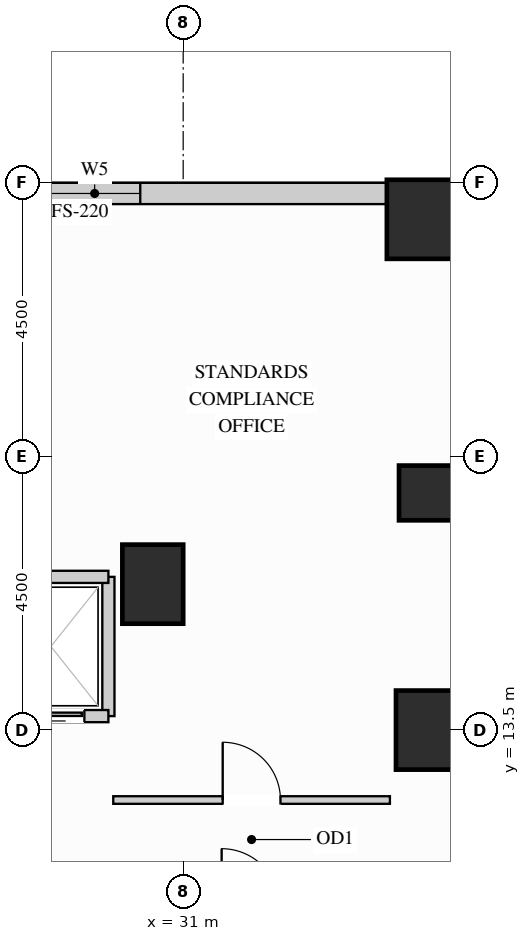
"""IFC4 building model, lengths in metres.
Left out: names, types, materials, properties, quantities, classifications, styles, units other than length and angle.
Written with IfcOpenShell. Run it as: python <this file> out.ifc"""

import sys

from ifc_helpers import new_model, si_unit, direction, frame, frame_2d, origin, origin_2d, place, context, subcontext, project, spatial, rectangle, extrude, source, transform, mapped, element, fill, save


model = new_model("IFC4")
c1 = context("Model", 3, precision=1e-05, world=origin(), true_north=direction((0.0, 1.0)))
c2 = subcontext(c1, "Body", "Model", "MODEL_VIEW")
j1 = project(units=[si_unit("LENGTHUNIT", "METRE"), si_unit("PLANEANGLEUNIT", "RADIAN")], contexts=[c1])
p1 = place(None, origin())
s1 = spatial("IfcSite", under=j1, at=p1, CompositionType="ELEMENT")
p2 = place(p1, origin())
s2 = spatial("IfcBuilding", under=s1, at=p2, CompositionType="ELEMENT")
p3 = place(p2, frame((0.0, 0.0, 26.1)))
s3 = spatial("IfcBuildingStorey", under=s2, at=p3, CompositionType="ELEMENT", Elevation=26.1)
m1 = source(origin(), c2, "Body", "SweptSolid", [
    extrude(rectangle(XDim=0.9, YDim=0.9, at=origin_2d()), origin(), (0.0, 0.0, 1.0), 3.38),
])
p4 = place(p3, frame((35.0, 17.4, 0.0), z_axis=(0.0, 0.0, 1.0), x_axis=(1.0, 0.0, 0.0)))
e1 = element("IfcColumn", 1, at=p4, inside=s3, PredefinedType="COLUMN", context=c2, shape_type="MappedRepresentation", body=[
    mapped(m1, transform((0.0, 0.0, 0.0), x_axis=(1.0, 0.0, 0.0), y_axis=(0.0, 1.0, 0.0), z_axis=(0.0, 0.0, 1.0))),
])
m2 = source(origin(), c2, "Body", "SweptSolid", [
    extrude(rectangle(XDim=1.0, YDim=1.3, at=origin_2d()), origin(), (0.0, 0.0, 1.0), 3.38),
])
for number, where, z_axis, x_axis in (
    (2, (35.0, 13.5, 0.0), (0.0, 0.0, 1.0), (1.0, 0.0, 0.0)),
    (3, (30.5, 15.9, 0.0), (0.0, 0.0, 1.0), (1.0, 0.0, 0.0)),
):
    element("IfcColumn", number, at=place(p3, frame(where, z_axis=z_axis, x_axis=x_axis)), inside=s3, PredefinedType="COLUMN", context=c2, shape_type="MappedRepresentation", body=[
        mapped(m2, transform((0.0, 0.0, 0.0), x_axis=(1.0, 0.0, 0.0), y_axis=(0.0, 1.0, 0.0), z_axis=(0.0, 0.0, 1.0))),
    ])
m3 = source(origin(), c2, "Body", "SweptSolid", [
    extrude(rectangle(XDim=1.3, YDim=1.3, at=origin_2d()), origin(), (0.0, 0.0, 1.0), 3.38),
])
p5 = place(p3, frame((35.0, 21.9, 0.0), z_axis=(0.0, 0.0, 1.0), x_axis=(1.0, 0.0, 0.0)))
e4 = element("IfcColumn", 4, at=p5, inside=s3, PredefinedType="COLUMN", context=c2, shape_type="MappedRepresentation", body=[
    mapped(m3, transform((0.0, 0.0, 0.0), x_axis=(1.0, 0.0, 0.0), y_axis=(0.0, 1.0, 0.0), z_axis=(0.0, 0.0, 1.0))),
])
p6 = place(p3, frame((34.352, 22.325, 0.0), z_axis=(0.0, 0.0, 1.0), x_axis=(-1.0, 0.0, 0.0)))
e5 = element("IfcWall", 5, at=p6, inside=s3, PredefinedType="SOLIDWALL", context=c2, shape_type="SweptSolid", body=[
    extrude(rectangle(XDim=14.854, YDim=0.35, at=frame_2d((7.427, 0.0))), origin(), (0.0, 0.0, 1.0), 3.365),
])
p7 = place(p6, frame((4.058, 0.0, 0.78)))
e6 = element("IfcOpeningElement", 6, at=p7, cuts=e5, PredefinedType="OPENING", context=c2, shape_type="SweptSolid", body=[
    extrude(rectangle(XDim=1.5, YDim=2.0, at=frame_2d((0.75, 1.0))), frame((0.0, 0.185, 0.0), z_axis=(0.0, -1.0, 0.0), x_axis=(1.0, 0.0, 0.0)), (0.0, 0.0, 1.0), 0.37),
])
p8 = place(p6, frame((9.296, 0.0, 0.78)))
e7 = element("IfcOpeningElement", 7, at=p8, cuts=e5, PredefinedType="OPENING", context=c2, shape_type="SweptSolid", body=[
    extrude(rectangle(XDim=1.5, YDim=2.0, at=frame_2d((0.75, 1.0))), frame((0.0, 0.185, 0.0), z_axis=(0.0, -1.0, 0.0), x_axis=(1.0, 0.0, 0.0)), (0.0, 0.0, 1.0), 0.37),
])
p9 = place(p3, frame((29.85, 12.35, 0.0), z_axis=(0.0, 0.0, 1.0), x_axis=(1.0, 0.0, 0.0)))
e8 = element("IfcWall", 8, at=p9, inside=s3, PredefinedType="PARTITIONING", context=c2, shape_type="SweptSolid", body=[
    extrude(rectangle(XDim=4.55, YDim=0.125, at=frame_2d((2.275, 0.0))), origin(), (0.0, 0.0, 1.0), 3.365),
])
p10 = place(p9, frame((1.8, 0.0, 0.0)))
e9 = element("IfcOpeningElement", 9, at=p10, cuts=e8, PredefinedType="OPENING", context=c2, shape_type="SweptSolid", body=[
    extrude(rectangle(XDim=0.95, YDim=2.15, at=frame_2d((0.475, 1.075))), frame((0.0, 0.073, 0.0), z_axis=(0.0, -1.0, 0.0), x_axis=(1.0, 0.0, 0.0)), (0.0, 0.0, 1.0), 0.145),
])
m4 = source(origin(), c2, "Body", "SweptSolid", [
    extrude(rectangle(XDim=2.29, YDim=0.2, at=frame_2d((1.145, 0.0))), origin(), (0.0, 0.0, 1.0), 3.365),
])
p11 = place(p3, frame((29.77, 13.73, 0.0), z_axis=(0.0, 0.0, 1.0), x_axis=(0.0, 1.0, 0.0)))
e10 = element("IfcWall", 10, at=p11, inside=s3, PredefinedType="PARTITIONING", context=c2, shape_type="MappedRepresentation", body=[
    mapped(m4, transform((0.0, 0.0, 0.0), x_axis=(1.0, 0.0, 0.0), y_axis=(0.0, 1.0, 0.0), z_axis=(0.0, 0.0, 1.0))),
])
m5 = source(origin(), c2, "Body", "SweptSolid", [
    extrude(rectangle(XDim=1.89, YDim=0.2, at=frame_2d((0.945, 0.0))), origin(), (0.0, 0.0, 1.0), 2.67),
])
p12 = place(p3, frame((27.88, 16.02, 0.0), z_axis=(0.0, 0.0, 1.0), x_axis=(1.0, 0.0, 0.0)))
e11 = element("IfcWall", 11, at=p12, inside=s3, PredefinedType="PARTITIONING", context=c2, shape_type="MappedRepresentation", body=[
    mapped(m5, transform((0.0, 0.0, 0.0), x_axis=(1.0, 0.0, 0.0), y_axis=(0.0, 1.0, 0.0), z_axis=(0.0, 0.0, 1.0))),
])
p13 = place(p3, frame((27.88, 13.73, 0.0), z_axis=(0.0, 0.0, 1.0), x_axis=(1.0, 0.0, 0.0)))
e12 = element("IfcWall", 12, at=p13, inside=s3, PredefinedType="PARTITIONING", context=c2, shape_type="SweptSolid", body=[
    extrude(rectangle(XDim=1.89, YDim=0.2, at=frame_2d((0.945, 0.0))), origin(), (0.0, 0.0, 1.0), 2.446),
])
p14 = place(p13, frame((0.395, 0.0, 0.0)))
e13 = element("IfcOpeningElement", 13, at=p14, cuts=e12, PredefinedType="OPENING", context=c2, shape_type="SweptSolid", body=[
    extrude(rectangle(XDim=1.1, YDim=2.2, at=frame_2d((0.55, 1.1))), frame((0.0, 0.11, 0.0), z_axis=(0.0, -1.0, 0.0), x_axis=(1.0, 0.0, 0.0)), (0.0, 0.0, 1.0), 0.22),
])
m6 = source(origin(), c2, "Body", "SweptSolid", [
    extrude(rectangle(XDim=1.1, YDim=2.2, at=frame_2d((0.55, 1.1))), frame((0.0, 0.025, 0.0), z_axis=(0.0, -1.0, 0.0), x_axis=(1.0, 0.0, 0.0)), (0.0, 0.0, 1.0), 0.05),
])
p15 = place(p14, origin())
e14 = element("IfcDoor", 14, at=p15, inside=s3, OperationType="SLIDING_TO_LEFT", PredefinedType="DOOR", context=c2, shape_type="MappedRepresentation", body=[
    mapped(m6, transform((0.0, 0.0, 0.0), x_axis=(1.0, 0.0, 0.0), y_axis=(0.0, 1.0, 0.0), z_axis=(0.0, 0.0, 1.0))),
])
fill(e13, e14)
m7 = source(origin(), c2, "Body", "SweptSolid", [
    extrude(rectangle(XDim=0.95, YDim=2.15, at=frame_2d((0.475, 1.075))), frame((0.0, 0.025, 0.0), z_axis=(0.0, -1.0, 0.0), x_axis=(1.0, 0.0, 0.0)), (0.0, 0.0, 1.0), 0.05),
])
p16 = place(p10, origin())
e15 = element("IfcDoor", 15, at=p16, inside=s3, OperationType="SINGLE_SWING_LEFT", PredefinedType="DOOR", context=c2, shape_type="MappedRepresentation", body=[
    mapped(m7, transform((0.0, 0.0, 0.0), x_axis=(1.0, 0.0, 0.0), y_axis=(0.0, 1.0, 0.0), z_axis=(0.0, 0.0, 1.0))),
])
fill(e9, e15)
m8 = source(origin(), c2, "Body", "SweptSolid", [
    extrude(rectangle(XDim=1.5, YDim=2.0, at=frame_2d((0.75, 1.0))), frame((0.0, 0.03, 0.0), z_axis=(0.0, -1.0, 0.0), x_axis=(1.0, 0.0, 0.0)), (0.0, 0.0, 1.0), 0.06),
])
p17 = place(p7, origin())
e16 = element("IfcWindow", 16, at=p17, inside=s3, PartitioningType="SINGLE_PANEL", PredefinedType="WINDOW", context=c2, shape_type="MappedRepresentation", body=[
    mapped(m8, transform((0.0, 0.0, 0.0), x_axis=(1.0, 0.0, 0.0), y_axis=(0.0, 1.0, 0.0), z_axis=(0.0, 0.0, 1.0))),
])
fill(e6, e16)
save(model, sys.argv[1])
